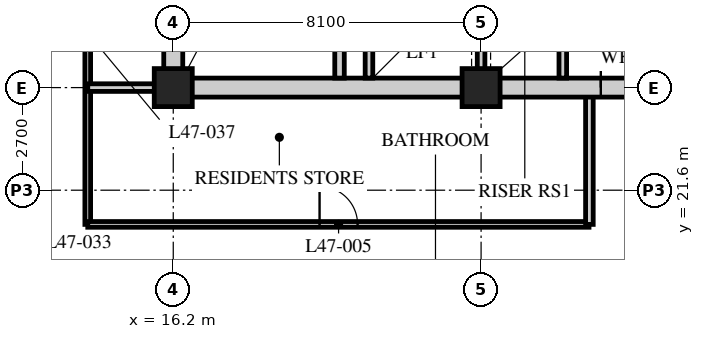
"""IFC4 building model, lengths in metres.
Left out: names, types, materials, properties, quantities, classifications, styles, units other than length and angle.
Written with IfcOpenShell. Run it as: python <this file> out.ifc"""

import sys

from ifc_helpers import new_model, si_unit, direction, frame, frame_2d, origin, origin_2d, place, context, subcontext, project, spatial, rectangle, hollow_rectangle, extrude, element, fill, save


model = new_model("IFC4")
c1 = context("Model", 3, precision=1e-05, world=origin(), true_north=direction((0.0, 1.0)))
c2 = subcontext(c1, "Body", "Model", "MODEL_VIEW")
j1 = project(units=[si_unit("LENGTHUNIT", "METRE"), si_unit("PLANEANGLEUNIT", "RADIAN")], contexts=[c1])
p1 = place(None, origin())
s1 = spatial("IfcSite", under=j1, at=p1, CompositionType="ELEMENT")
p2 = place(p1, origin())
s2 = spatial("IfcBuilding", under=s1, at=p2, CompositionType="ELEMENT")
p3 = place(p2, frame((0.0, 0.0, 184.8)))
s3 = spatial("IfcBuildingStorey", under=s2, at=p3, CompositionType="ELEMENT", Elevation=184.8)
for number, where, z_axis, x_axis in (
    (1, (16.2, 24.3, 0.0), (0.0, 0.0, 1.0), (1.0, 0.0, 0.0)),
    (2, (24.3, 24.3, 0.0), (0.0, 0.0, 1.0), (1.0, 0.0, 0.0)),
):
    element("IfcColumn", number, at=place(p3, frame(where, z_axis=z_axis, x_axis=x_axis)), inside=s3, PredefinedType="COLUMN", context=c2, shape_type="SweptSolid", body=[
        extrude(hollow_rectangle(XDim=1.0, YDim=1.0, WallThickness=0.1, at=origin_2d()), origin(), (0.0, 0.0, 1.0), 3.6),
    ])
p4 = place(p3, frame((13.95, 45.45, 0.0), z_axis=(0.0, 0.0, 1.0), x_axis=(0.0, -1.0, 0.0)))
e3 = element("IfcWall", 3, at=p4, inside=s3, PredefinedType="PARTITIONING", context=c2, shape_type="SweptSolid", body=[
    extrude(rectangle(XDim=24.75, YDim=0.15, at=frame_2d((12.375, 0.0))), origin(), (0.0, 0.0, 1.0), 3.39),
])
p5 = place(p4, frame((16.6, 0.0, 0.0)))
e4 = element("IfcOpeningElement", 4, at=p5, cuts=e3, PredefinedType="OPENING", context=c2, shape_type="SweptSolid", body=[
    extrude(rectangle(XDim=1.0, YDim=2.1, at=frame_2d((0.5, 1.05))), frame((0.0, 0.085, 0.0), z_axis=(0.0, -1.0, 0.0), x_axis=(1.0, 0.0, 0.0)), (0.0, 0.0, 1.0), 0.17),
])
p6 = place(p4, frame((8.5, 0.0, 0.0)))
e5 = element("IfcOpeningElement", 5, at=p6, cuts=e3, PredefinedType="OPENING", context=c2, shape_type="SweptSolid", body=[
    extrude(rectangle(XDim=1.0, YDim=2.1, at=frame_2d((0.5, 1.05))), frame((0.0, 0.085, 0.0), z_axis=(0.0, -1.0, 0.0), x_axis=(1.0, 0.0, 0.0)), (0.0, 0.0, 1.0), 0.17),
])
p7 = place(p3, frame((13.95, 20.7, 0.0), z_axis=(0.0, 0.0, 1.0), x_axis=(1.0, 0.0, 0.0)))
e6 = element("IfcWall", 6, at=p7, inside=s3, PredefinedType="PARTITIONING", context=c2, shape_type="SweptSolid", body=[
    extrude(rectangle(XDim=13.19, YDim=0.15, at=frame_2d((6.595, 0.0))), origin(), (0.0, 0.0, 1.0), 3.39),
])
p8 = place(p7, frame((6.1, 0.0, 0.0)))
e7 = element("IfcOpeningElement", 7, at=p8, cuts=e6, PredefinedType="OPENING", context=c2, shape_type="SweptSolid", body=[
    extrude(rectangle(XDim=1.0, YDim=2.1, at=frame_2d((0.5, 1.05))), frame((0.0, 0.085, 0.0), z_axis=(0.0, -1.0, 0.0), x_axis=(1.0, 0.0, 0.0)), (0.0, 0.0, 1.0), 0.17),
])
p9 = place(p3, frame((27.15, 20.7, 0.0), z_axis=(0.0, 0.0, 1.0), x_axis=(0.0, 1.0, 0.0)))
e8 = element("IfcWall", 8, at=p9, inside=s3, PredefinedType="SOLIDWALL", context=c2, shape_type="SweptSolid", body=[
    extrude(rectangle(XDim=3.6, YDim=0.2, at=frame_2d((1.8, 0.0))), origin(), (0.0, 0.0, 1.0), 3.39),
])
p10 = place(p3, frame((13.95, 24.3, 0.0), z_axis=(0.0, 0.0, 1.0), x_axis=(1.0, 0.0, 0.0)))
e9 = element("IfcWall", 9, at=p10, inside=s3, PredefinedType="SOLIDWALL", context=c2, shape_type="SweptSolid", body=[
    extrude(rectangle(XDim=2.25, YDim=0.2, at=frame_2d((1.125, 0.0))), origin(), (0.0, 0.0, 1.0), 3.39),
])
p11 = place(p3, frame((15.95, 24.3, 0.0), z_axis=(0.0, 0.0, 1.0), x_axis=(1.0, 0.0, 0.0)))
e10 = element("IfcWall", 10, at=p11, inside=s3, PredefinedType="SOLIDWALL", context=c2, shape_type="SweptSolid", body=[
    extrude(rectangle(XDim=24.8, YDim=0.5, at=frame_2d((12.4, 0.0))), origin(), (0.0, 0.0, 1.0), 2.74),
])
p12 = place(p11, frame((11.5, 0.0, 0.0)))
e11 = element("IfcOpeningElement", 11, at=p12, cuts=e10, PredefinedType="OPENING", context=c2, shape_type="SweptSolid", body=[
    extrude(rectangle(XDim=1.8, YDim=2.4, at=frame_2d((0.9, 1.2))), frame((0.0, 0.26, 0.0), z_axis=(0.0, -1.0, 0.0), x_axis=(1.0, 0.0, 0.0)), (0.0, 0.0, 1.0), 0.52),
])
p13 = place(p3, frame((16.2, 24.55, 0.0), z_axis=(0.0, 0.0, 1.0), x_axis=(0.0, 1.0, 0.0)))
e12 = element("IfcWall", 12, at=p13, inside=s3, PredefinedType="SOLIDWALL", context=c2, shape_type="SweptSolid", body=[
    extrude(rectangle(XDim=15.7, YDim=0.5, at=frame_2d((7.85, 0.0))), origin(), (0.0, 0.0, 1.0), 2.778),
])
p14 = place(p3, frame((24.3, 24.55, 0.0), z_axis=(0.0, 0.0, 1.0), x_axis=(0.0, 1.0, 0.0)))
e13 = element("IfcWall", 13, at=p14, inside=s3, PredefinedType="SOLIDWALL", context=c2, shape_type="SweptSolid", body=[
    extrude(rectangle(XDim=7.75, YDim=0.2, at=frame_2d((3.875, 0.0))), origin(), (0.0, 0.0, 1.0), 2.778),
])
p15 = place(p14, frame((4.6, 0.0, 0.0)))
e14 = element("IfcOpeningElement", 14, at=p15, cuts=e13, PredefinedType="OPENING", context=c2, shape_type="SweptSolid", body=[
    extrude(rectangle(XDim=1.2, YDim=2.1, at=frame_2d((0.6, 1.05))), frame((0.0, 0.11, 0.0), z_axis=(0.0, -1.0, 0.0), x_axis=(1.0, 0.0, 0.0)), (0.0, 0.0, 1.0), 0.22),
])
p16 = place(p3, frame((20.575, 24.55, 0.0), z_axis=(0.0, 0.0, 1.0), x_axis=(0.0, 1.0, 0.0)))
e15 = element("IfcWall", 15, at=p16, inside=s3, PredefinedType="SOLIDWALL", context=c2, shape_type="SweptSolid", body=[
    extrude(rectangle(XDim=7.75, YDim=0.25, at=frame_2d((3.875, 0.0))), origin(), (0.0, 0.0, 1.0), 3.39),
])
p17 = place(p16, frame((6.2, 0.0, 0.0)))
e16 = element("IfcOpeningElement", 16, at=p17, cuts=e15, PredefinedType="OPENING", context=c2, shape_type="SweptSolid", body=[
    extrude(rectangle(XDim=1.2, YDim=2.1, at=frame_2d((0.6, 1.05))), frame((0.0, 0.135, 0.0), z_axis=(0.0, -1.0, 0.0), x_axis=(1.0, 0.0, 0.0)), (0.0, 0.0, 1.0), 0.27),
])
p18 = place(p3, frame((21.35, 24.55, 0.0), z_axis=(0.0, 0.0, 1.0), x_axis=(0.0, 1.0, 0.0)))
e17 = element("IfcWall", 17, at=p18, inside=s3, PredefinedType="SOLIDWALL", context=c2, shape_type="SweptSolid", body=[
    extrude(rectangle(XDim=2.6, YDim=0.2, at=frame_2d((1.3, 0.0))), origin(), (0.0, 0.0, 1.0), 3.39),
])
p19 = place(p3, frame((26.45, 24.55, 0.0), z_axis=(0.0, 0.0, 1.0), x_axis=(0.0, 1.0, 0.0)))
e18 = element("IfcWall", 18, at=p19, inside=s3, PredefinedType="SOLIDWALL", context=c2, shape_type="SweptSolid", body=[
    extrude(rectangle(XDim=1.6, YDim=0.2, at=frame_2d((0.8, 0.0))), origin(), (0.0, 0.0, 1.0), 3.39),
])
p20 = place(p8, origin())
e19 = element("IfcDoor", 19, at=p20, inside=s3, OperationType="SINGLE_SWING_LEFT", PredefinedType="DOOR", context=c2, shape_type="SweptSolid", body=[
    extrude(rectangle(XDim=1.0, YDim=2.1, at=frame_2d((0.5, 1.05))), frame((0.0, 0.025, 0.0), z_axis=(0.0, -1.0, 0.0), x_axis=(1.0, 0.0, 0.0)), (0.0, 0.0, 1.0), 0.05),
])
fill(e7, e19)
p21 = place(p12, origin())
e20 = element("IfcDoor", 20, at=p21, inside=s3, OperationType="DOUBLE_DOOR_SINGLE_SWING", PredefinedType="DOOR", context=c2, shape_type="SweptSolid", body=[
    extrude(rectangle(XDim=1.8, YDim=2.4, at=frame_2d((0.9, 1.2))), frame((0.0, 0.025, 0.0), z_axis=(0.0, -1.0, 0.0), x_axis=(1.0, 0.0, 0.0)), (0.0, 0.0, 1.0), 0.05),
])
fill(e11, e20)
save(model, sys.argv[1])
